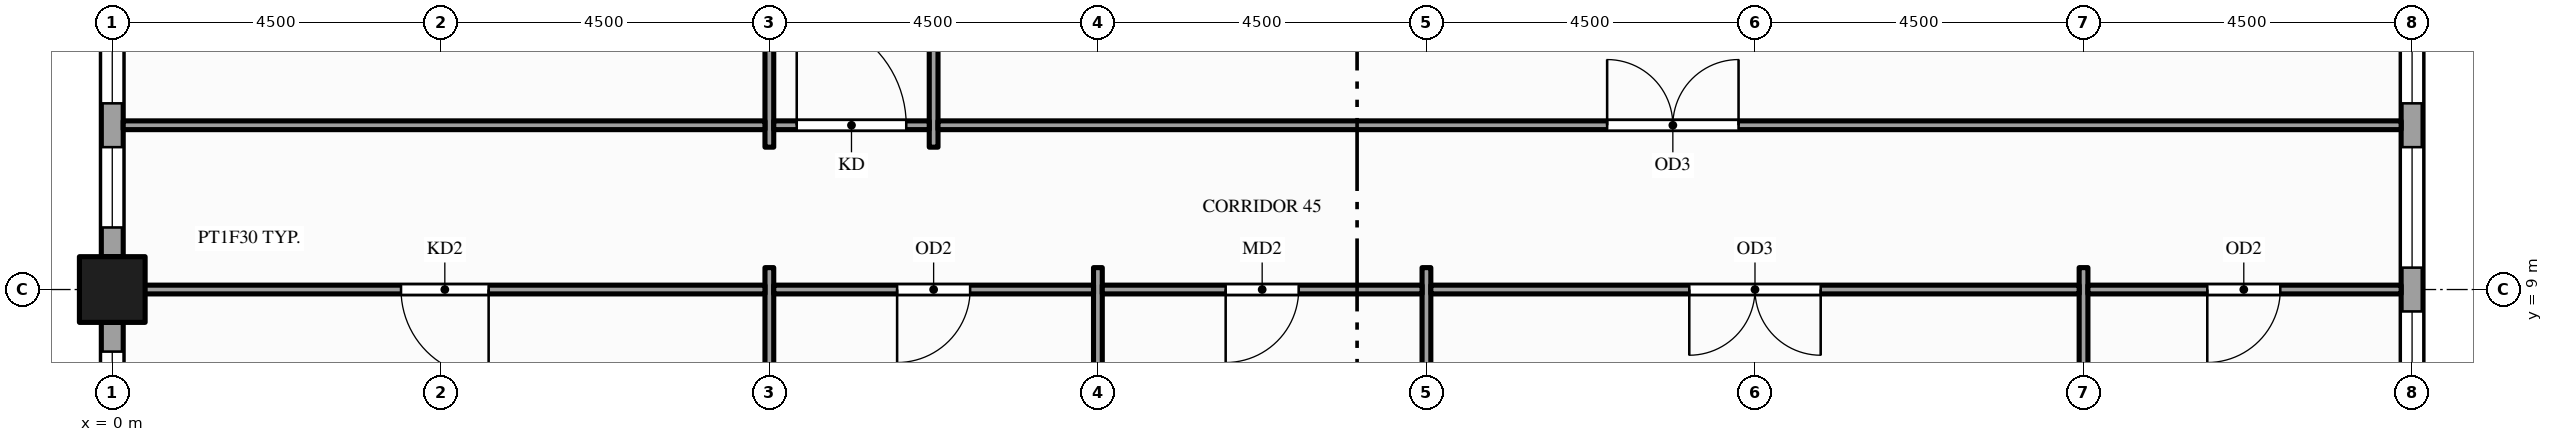
"""IFC4 building model, lengths in metres.
Left out: names, types, materials, properties, quantities, classifications, styles, units other than length and angle.
Written with IfcOpenShell. Run it as: python <this file> out.ifc"""

import sys

from ifc_helpers import new_model, si_unit, direction, frame, frame_2d, origin, origin_2d, place, context, subcontext, project, spatial, rectangle, hollow_rectangle, extrude, element, fill, save


model = new_model("IFC4")
c1 = context("Model", 3, precision=1e-05, world=origin(), true_north=direction((0.0, 1.0)))
c2 = subcontext(c1, "Body", "Model", "MODEL_VIEW")
j1 = project(units=[si_unit("LENGTHUNIT", "METRE"), si_unit("PLANEANGLEUNIT", "RADIAN")], contexts=[c1])
p1 = place(None, origin())
s1 = spatial("IfcSite", under=j1, at=p1, CompositionType="ELEMENT")
p2 = place(p1, origin())
s2 = spatial("IfcBuilding", under=s1, at=p2, CompositionType="ELEMENT")
p3 = place(p2, frame((0.0, 0.0, 147.0)))
s3 = spatial("IfcBuildingStorey", under=s2, at=p3, CompositionType="ELEMENT", Elevation=147.0)
p4 = place(p3, frame((0.0, 9.0, -0.15), z_axis=(0.0, 0.0, 1.0), x_axis=(1.0, 0.0, 0.0)))
e1 = element("IfcColumn", 1, at=p4, inside=s3, PredefinedType="COLUMN", context=c2, shape_type="SweptSolid", body=[
    extrude(hollow_rectangle(XDim=0.9, YDim=0.9, WallThickness=0.045, at=origin_2d()), origin(), (0.0, 0.0, 1.0), 4.0),
])
p5 = place(p3, frame((0.0, 13.05, 0.0), z_axis=(0.0, 0.0, 1.0), x_axis=(0.0, -1.0, 0.0)))
e2 = element("IfcWall", 2, at=p5, inside=s3, PredefinedType="STANDARD", context=c2, shape_type="SweptSolid", body=[
    extrude(rectangle(XDim=3.6, YDim=0.3, at=frame_2d((1.8, 0.0))), origin(), (0.0, 0.0, 1.0), 3.149),
])
p6 = place(p5, frame((0.4, 0.0, 0.9)))
e3 = element("IfcOpeningElement", 3, at=p6, cuts=e2, PredefinedType="OPENING", context=c2, shape_type="SweptSolid", body=[
    extrude(rectangle(XDim=1.1, YDim=2.0, at=frame_2d((0.55, 1.0))), frame((0.0, 0.16, 0.0), z_axis=(0.0, -1.0, 0.0), x_axis=(1.0, 0.0, 0.0)), (0.0, 0.0, 1.0), 0.32),
])
p7 = place(p5, frame((2.1, 0.0, 0.9)))
e4 = element("IfcOpeningElement", 4, at=p7, cuts=e2, PredefinedType="OPENING", context=c2, shape_type="SweptSolid", body=[
    extrude(rectangle(XDim=1.1, YDim=2.0, at=frame_2d((0.55, 1.0))), frame((0.0, 0.16, 0.0), z_axis=(0.0, -1.0, 0.0), x_axis=(1.0, 0.0, 0.0)), (0.0, 0.0, 1.0), 0.32),
])
p8 = place(p3, frame((0.0, 8.55, 0.0), z_axis=(0.0, 0.0, 1.0), x_axis=(0.0, -1.0, 0.0)))
e5 = element("IfcWall", 5, at=p8, inside=s3, PredefinedType="STANDARD", context=c2, shape_type="SweptSolid", body=[
    extrude(rectangle(XDim=3.6, YDim=0.3, at=frame_2d((1.8, 0.0))), origin(), (0.0, 0.0, 1.0), 3.149),
])
p9 = place(p8, frame((0.4, 0.0, 0.9)))
e6 = element("IfcOpeningElement", 6, at=p9, cuts=e5, PredefinedType="OPENING", context=c2, shape_type="SweptSolid", body=[
    extrude(rectangle(XDim=1.1, YDim=2.0, at=frame_2d((0.55, 1.0))), frame((0.0, 0.16, 0.0), z_axis=(0.0, -1.0, 0.0), x_axis=(1.0, 0.0, 0.0)), (0.0, 0.0, 1.0), 0.32),
])
p10 = place(p8, frame((2.1, 0.0, 0.9)))
e7 = element("IfcOpeningElement", 7, at=p10, cuts=e5, PredefinedType="OPENING", context=c2, shape_type="SweptSolid", body=[
    extrude(rectangle(XDim=1.1, YDim=2.0, at=frame_2d((0.55, 1.0))), frame((0.0, 0.16, 0.0), z_axis=(0.0, -1.0, 0.0), x_axis=(1.0, 0.0, 0.0)), (0.0, 0.0, 1.0), 0.32),
])
p11 = place(p3, frame((31.5, 1.95, 0.0), z_axis=(0.0, 0.0, 1.0), x_axis=(0.0, 1.0, 0.0)))
e8 = element("IfcWall", 8, at=p11, inside=s3, PredefinedType="STANDARD", context=c2, shape_type="SweptSolid", body=[
    extrude(rectangle(XDim=21.6, YDim=0.3, at=frame_2d((10.8, 0.0))), origin(), (0.0, 0.0, 1.0), 2.87),
])
p12 = place(p11, frame((0.6, 0.0, 0.9)))
e9 = element("IfcOpeningElement", 9, at=p12, cuts=e8, PredefinedType="OPENING", context=c2, shape_type="SweptSolid", body=[
    extrude(rectangle(XDim=1.65, YDim=1.75, at=frame_2d((0.825, 0.875))), frame((0.0, 0.16, 0.0), z_axis=(0.0, -1.0, 0.0), x_axis=(1.0, 0.0, 0.0)), (0.0, 0.0, 1.0), 0.32),
])
p13 = place(p11, frame((2.85, 0.0, 0.9)))
e10 = element("IfcOpeningElement", 10, at=p13, cuts=e8, PredefinedType="OPENING", context=c2, shape_type="SweptSolid", body=[
    extrude(rectangle(XDim=1.65, YDim=1.75, at=frame_2d((0.825, 0.875))), frame((0.0, 0.16, 0.0), z_axis=(0.0, -1.0, 0.0), x_axis=(1.0, 0.0, 0.0)), (0.0, 0.0, 1.0), 0.32),
])
p14 = place(p11, frame((5.1, 0.0, 0.9)))
e11 = element("IfcOpeningElement", 11, at=p14, cuts=e8, PredefinedType="OPENING", context=c2, shape_type="SweptSolid", body=[
    extrude(rectangle(XDim=1.65, YDim=1.75, at=frame_2d((0.825, 0.875))), frame((0.0, 0.16, 0.0), z_axis=(0.0, -1.0, 0.0), x_axis=(1.0, 0.0, 0.0)), (0.0, 0.0, 1.0), 0.32),
])
p15 = place(p11, frame((7.35, 0.0, 0.9)))
e12 = element("IfcOpeningElement", 12, at=p15, cuts=e8, PredefinedType="OPENING", context=c2, shape_type="SweptSolid", body=[
    extrude(rectangle(XDim=1.65, YDim=1.75, at=frame_2d((0.825, 0.875))), frame((0.0, 0.16, 0.0), z_axis=(0.0, -1.0, 0.0), x_axis=(1.0, 0.0, 0.0)), (0.0, 0.0, 1.0), 0.32),
])
p16 = place(p11, frame((9.6, 0.0, 0.9)))
e13 = element("IfcOpeningElement", 13, at=p16, cuts=e8, PredefinedType="OPENING", context=c2, shape_type="SweptSolid", body=[
    extrude(rectangle(XDim=1.65, YDim=1.75, at=frame_2d((0.825, 0.875))), frame((0.0, 0.16, 0.0), z_axis=(0.0, -1.0, 0.0), x_axis=(1.0, 0.0, 0.0)), (0.0, 0.0, 1.0), 0.32),
])
p17 = place(p11, frame((11.85, 0.0, 0.9)))
e14 = element("IfcOpeningElement", 14, at=p17, cuts=e8, PredefinedType="OPENING", context=c2, shape_type="SweptSolid", body=[
    extrude(rectangle(XDim=1.65, YDim=1.75, at=frame_2d((0.825, 0.875))), frame((0.0, 0.16, 0.0), z_axis=(0.0, -1.0, 0.0), x_axis=(1.0, 0.0, 0.0)), (0.0, 0.0, 1.0), 0.32),
])
p18 = place(p11, frame((14.1, 0.0, 0.9)))
e15 = element("IfcOpeningElement", 15, at=p18, cuts=e8, PredefinedType="OPENING", context=c2, shape_type="SweptSolid", body=[
    extrude(rectangle(XDim=1.65, YDim=1.75, at=frame_2d((0.825, 0.875))), frame((0.0, 0.16, 0.0), z_axis=(0.0, -1.0, 0.0), x_axis=(1.0, 0.0, 0.0)), (0.0, 0.0, 1.0), 0.32),
])
p19 = place(p11, frame((16.35, 0.0, 0.9)))
e16 = element("IfcOpeningElement", 16, at=p19, cuts=e8, PredefinedType="OPENING", context=c2, shape_type="SweptSolid", body=[
    extrude(rectangle(XDim=1.65, YDim=1.75, at=frame_2d((0.825, 0.875))), frame((0.0, 0.16, 0.0), z_axis=(0.0, -1.0, 0.0), x_axis=(1.0, 0.0, 0.0)), (0.0, 0.0, 1.0), 0.32),
])
p20 = place(p11, frame((18.6, 0.0, 0.9)))
e17 = element("IfcOpeningElement", 17, at=p20, cuts=e8, PredefinedType="OPENING", context=c2, shape_type="SweptSolid", body=[
    extrude(rectangle(XDim=1.65, YDim=1.75, at=frame_2d((0.825, 0.875))), frame((0.0, 0.16, 0.0), z_axis=(0.0, -1.0, 0.0), x_axis=(1.0, 0.0, 0.0)), (0.0, 0.0, 1.0), 0.32),
])
p21 = place(p3, frame((9.0, 3.875, 0.0), z_axis=(0.0, 0.0, 1.0), x_axis=(0.0, 1.0, 0.0)))
e18 = element("IfcWall", 18, at=p21, inside=s3, PredefinedType="PARTITIONING", context=c2, shape_type="SweptSolid", body=[
    extrude(rectangle(XDim=5.425, YDim=0.12, at=frame_2d((2.712, 0.0))), origin(), (0.0, 0.0, 1.0), 2.87),
])
p22 = place(p3, frame((9.0, 10.95, 0.0), z_axis=(0.0, 0.0, 1.0), x_axis=(0.0, 1.0, 0.0)))
e19 = element("IfcWall", 19, at=p22, inside=s3, PredefinedType="PARTITIONING", context=c2, shape_type="SweptSolid", body=[
    extrude(rectangle(XDim=20.85, YDim=0.12, at=frame_2d((10.425, 0.0))), origin(), (0.0, 0.0, 1.0), 2.6),
])
p23 = place(p22, frame((2.05, 0.0, 0.0)))
e20 = element("IfcOpeningElement", 20, at=p23, cuts=e19, PredefinedType="OPENING", context=c2, shape_type="SweptSolid", body=[
    extrude(rectangle(XDim=1.0, YDim=2.1, at=frame_2d((0.5, 1.05))), frame((0.0, 0.07, 0.0), z_axis=(0.0, -1.0, 0.0), x_axis=(1.0, 0.0, 0.0)), (0.0, 0.0, 1.0), 0.14),
])
p24 = place(p22, frame((6.55, 0.0, 0.0)))
e21 = element("IfcOpeningElement", 21, at=p24, cuts=e19, PredefinedType="OPENING", context=c2, shape_type="SweptSolid", body=[
    extrude(rectangle(XDim=1.0, YDim=2.1, at=frame_2d((0.5, 1.05))), frame((0.0, 0.07, 0.0), z_axis=(0.0, -1.0, 0.0), x_axis=(1.0, 0.0, 0.0)), (0.0, 0.0, 1.0), 0.14),
])
p25 = place(p22, frame((11.805, 0.0, 0.0)))
e22 = element("IfcOpeningElement", 22, at=p25, cuts=e19, PredefinedType="OPENING", context=c2, shape_type="SweptSolid", body=[
    extrude(rectangle(XDim=1.8, YDim=2.1, at=frame_2d((0.9, 1.05))), frame((0.0, 0.07, 0.0), z_axis=(0.0, -1.0, 0.0), x_axis=(1.0, 0.0, 0.0)), (0.0, 0.0, 1.0), 0.14),
])
p26 = place(p3, frame((11.25, 10.95, 0.0), z_axis=(0.0, 0.0, 1.0), x_axis=(0.0, 1.0, 0.0)))
e23 = element("IfcWall", 23, at=p26, inside=s3, PredefinedType="PARTITIONING", context=c2, shape_type="SweptSolid", body=[
    extrude(rectangle(XDim=20.85, YDim=0.12, at=frame_2d((10.425, 0.0))), origin(), (0.0, 0.0, 1.0), 2.6),
])
p27 = place(p26, frame((17.8, 0.0, 0.0)))
e24 = element("IfcOpeningElement", 24, at=p27, cuts=e23, PredefinedType="OPENING", context=c2, shape_type="SweptSolid", body=[
    extrude(rectangle(XDim=1.0, YDim=2.1, at=frame_2d((0.5, 1.05))), frame((0.0, 0.07, 0.0), z_axis=(0.0, -1.0, 0.0), x_axis=(1.0, 0.0, 0.0)), (0.0, 0.0, 1.0), 0.14),
])
p28 = place(p26, frame((4.2, 0.0, 0.0)))
e25 = element("IfcOpeningElement", 25, at=p28, cuts=e23, PredefinedType="OPENING", context=c2, shape_type="SweptSolid", body=[
    extrude(rectangle(XDim=1.2, YDim=2.1, at=frame_2d((0.6, 1.05))), frame((0.0, 0.07, 0.0), z_axis=(0.0, -1.0, 0.0), x_axis=(1.0, 0.0, 0.0)), (0.0, 0.0, 1.0), 0.14),
])
for number, where, z_axis, x_axis in (
    (26, (13.5, 0.15, 0.0), (0.0, 0.0, 1.0), (0.0, 1.0, 0.0)),
    (27, (18.0, 0.15, 0.0), (0.0, 0.0, 1.0), (0.0, 1.0, 0.0)),
):
    element("IfcWall", number, at=place(p3, frame(where, z_axis=z_axis, x_axis=x_axis)), inside=s3, PredefinedType="PARTITIONING", context=c2, shape_type="SweptSolid", body=[
        extrude(rectangle(XDim=9.15, YDim=0.12, at=frame_2d((4.575, 0.0))), origin(), (0.0, 0.0, 1.0), 2.87),
    ])
p29 = place(p3, frame((27.0, 1.65, 0.0), z_axis=(0.0, 0.0, 1.0), x_axis=(0.0, 1.0, 0.0)))
e28 = element("IfcWall", 28, at=p29, inside=s3, PredefinedType="PARTITIONING", context=c2, shape_type="SweptSolid", body=[
    extrude(rectangle(XDim=7.65, YDim=0.12, at=frame_2d((3.825, 0.0))), origin(), (0.0, 0.0, 1.0), 2.87),
])
p30 = place(p3, frame((0.15, 9.0, 0.0), z_axis=(0.0, 0.0, 1.0), x_axis=(1.0, 0.0, 0.0)))
e29 = element("IfcWall", 29, at=p30, inside=s3, PredefinedType="PARTITIONING", context=c2, shape_type="SweptSolid", body=[
    extrude(rectangle(XDim=8.79, YDim=0.12, at=frame_2d((4.395, 0.0))), origin(), (0.0, 0.0, 1.0), 2.87),
])
p31 = place(p30, frame((3.805, 0.0, 0.0)))
e30 = element("IfcOpeningElement", 30, at=p31, cuts=e29, PredefinedType="OPENING", context=c2, shape_type="SweptSolid", body=[
    extrude(rectangle(XDim=1.2, YDim=2.1, at=frame_2d((0.6, 1.05))), frame((0.0, 0.07, 0.0), z_axis=(0.0, -1.0, 0.0), x_axis=(1.0, 0.0, 0.0)), (0.0, 0.0, 1.0), 0.14),
])
p32 = place(p3, frame((9.06, 9.0, 0.0), z_axis=(0.0, 0.0, 1.0), x_axis=(1.0, 0.0, 0.0)))
e31 = element("IfcWall", 31, at=p32, inside=s3, PredefinedType="PARTITIONING", context=c2, shape_type="SweptSolid", body=[
    extrude(rectangle(XDim=4.38, YDim=0.12, at=frame_2d((2.19, 0.0))), origin(), (0.0, 0.0, 1.0), 2.87),
])
p33 = place(p32, frame((1.69, 0.0, 0.0)))
e32 = element("IfcOpeningElement", 32, at=p33, cuts=e31, PredefinedType="OPENING", context=c2, shape_type="SweptSolid", body=[
    extrude(rectangle(XDim=1.0, YDim=2.1, at=frame_2d((0.5, 1.05))), frame((0.0, 0.07, 0.0), z_axis=(0.0, -1.0, 0.0), x_axis=(1.0, 0.0, 0.0)), (0.0, 0.0, 1.0), 0.14),
])
p34 = place(p3, frame((13.56, 9.0, 0.0), z_axis=(0.0, 0.0, 1.0), x_axis=(1.0, 0.0, 0.0)))
e33 = element("IfcWall", 33, at=p34, inside=s3, PredefinedType="PARTITIONING", context=c2, shape_type="SweptSolid", body=[
    extrude(rectangle(XDim=4.38, YDim=0.12, at=frame_2d((2.19, 0.0))), origin(), (0.0, 0.0, 1.0), 2.87),
])
p35 = place(p34, frame((1.69, 0.0, 0.0)))
e34 = element("IfcOpeningElement", 34, at=p35, cuts=e33, PredefinedType="OPENING", context=c2, shape_type="SweptSolid", body=[
    extrude(rectangle(XDim=1.0, YDim=2.1, at=frame_2d((0.5, 1.05))), frame((0.0, 0.07, 0.0), z_axis=(0.0, -1.0, 0.0), x_axis=(1.0, 0.0, 0.0)), (0.0, 0.0, 1.0), 0.14),
])
p36 = place(p3, frame((18.06, 9.0, 0.0), z_axis=(0.0, 0.0, 1.0), x_axis=(1.0, 0.0, 0.0)))
e35 = element("IfcWall", 35, at=p36, inside=s3, PredefinedType="PARTITIONING", context=c2, shape_type="SweptSolid", body=[
    extrude(rectangle(XDim=8.88, YDim=0.12, at=frame_2d((4.44, 0.0))), origin(), (0.0, 0.0, 1.0), 2.87),
])
p37 = place(p36, frame((3.54, 0.0, 0.0)))
e36 = element("IfcOpeningElement", 36, at=p37, cuts=e35, PredefinedType="OPENING", context=c2, shape_type="SweptSolid", body=[
    extrude(rectangle(XDim=1.8, YDim=2.1, at=frame_2d((0.9, 1.05))), frame((0.0, 0.07, 0.0), z_axis=(0.0, -1.0, 0.0), x_axis=(1.0, 0.0, 0.0)), (0.0, 0.0, 1.0), 0.14),
])
p38 = place(p3, frame((27.06, 9.0, 0.0), z_axis=(0.0, 0.0, 1.0), x_axis=(1.0, 0.0, 0.0)))
e37 = element("IfcWall", 37, at=p38, inside=s3, PredefinedType="PARTITIONING", context=c2, shape_type="SweptSolid", body=[
    extrude(rectangle(XDim=4.29, YDim=0.12, at=frame_2d((2.145, 0.0))), origin(), (0.0, 0.0, 1.0), 2.87),
])
p39 = place(p38, frame((1.635, 0.0, 0.0)))
e38 = element("IfcOpeningElement", 38, at=p39, cuts=e37, PredefinedType="OPENING", context=c2, shape_type="SweptSolid", body=[
    extrude(rectangle(XDim=1.0, YDim=2.1, at=frame_2d((0.5, 1.05))), frame((0.0, 0.07, 0.0), z_axis=(0.0, -1.0, 0.0), x_axis=(1.0, 0.0, 0.0)), (0.0, 0.0, 1.0), 0.14),
])
p40 = place(p3, frame((0.15, 11.25, 0.0), z_axis=(0.0, 0.0, 1.0), x_axis=(1.0, 0.0, 0.0)))
e39 = element("IfcWall", 39, at=p40, inside=s3, PredefinedType="PARTITIONING", context=c2, shape_type="SweptSolid", body=[
    extrude(rectangle(XDim=8.79, YDim=0.12, at=frame_2d((4.395, 0.0))), origin(), (0.0, 0.0, 1.0), 2.87),
])
p41 = place(p3, frame((9.06, 11.25, 0.0), z_axis=(0.0, 0.0, 1.0), x_axis=(1.0, 0.0, 0.0)))
e40 = element("IfcWall", 40, at=p41, inside=s3, PredefinedType="PARTITIONING", context=c2, shape_type="SweptSolid", body=[
    extrude(rectangle(XDim=2.13, YDim=0.12, at=frame_2d((1.065, 0.0))), origin(), (0.0, 0.0, 1.0), 2.87),
])
p42 = place(p41, frame((0.315, 0.0, 0.0)))
e41 = element("IfcOpeningElement", 41, at=p42, cuts=e40, PredefinedType="OPENING", context=c2, shape_type="SweptSolid", body=[
    extrude(rectangle(XDim=1.5, YDim=2.1, at=frame_2d((0.75, 1.05))), frame((0.0, 0.07, 0.0), z_axis=(0.0, -1.0, 0.0), x_axis=(1.0, 0.0, 0.0)), (0.0, 0.0, 1.0), 0.14),
])
p43 = place(p3, frame((11.31, 11.25, 0.0), z_axis=(0.0, 0.0, 1.0), x_axis=(1.0, 0.0, 0.0)))
e42 = element("IfcWall", 42, at=p43, inside=s3, PredefinedType="PARTITIONING", context=c2, shape_type="SweptSolid", body=[
    extrude(rectangle(XDim=20.04, YDim=0.12, at=frame_2d((10.02, 0.0))), origin(), (0.0, 0.0, 1.0), 2.87),
])
p44 = place(p43, frame((9.165, 0.0, 0.0)))
e43 = element("IfcOpeningElement", 43, at=p44, cuts=e42, PredefinedType="OPENING", context=c2, shape_type="SweptSolid", body=[
    extrude(rectangle(XDim=1.8, YDim=2.1, at=frame_2d((0.9, 1.05))), frame((0.0, 0.07, 0.0), z_axis=(0.0, -1.0, 0.0), x_axis=(1.0, 0.0, 0.0)), (0.0, 0.0, 1.0), 0.14),
])
p45 = place(p6, origin())
e44 = element("IfcWindow", 44, at=p45, inside=s3, PartitioningType="SINGLE_PANEL", PredefinedType="WINDOW", context=c2, shape_type="SweptSolid", body=[
    extrude(rectangle(XDim=1.1, YDim=2.0, at=frame_2d((0.55, 1.0))), frame((0.0, 0.03, 0.0), z_axis=(0.0, -1.0, 0.0), x_axis=(1.0, 0.0, 0.0)), (0.0, 0.0, 1.0), 0.06),
])
fill(e3, e44)
p46 = place(p7, origin())
e45 = element("IfcWindow", 45, at=p46, inside=s3, PartitioningType="SINGLE_PANEL", PredefinedType="WINDOW", context=c2, shape_type="SweptSolid", body=[
    extrude(rectangle(XDim=1.1, YDim=2.0, at=frame_2d((0.55, 1.0))), frame((0.0, 0.03, 0.0), z_axis=(0.0, -1.0, 0.0), x_axis=(1.0, 0.0, 0.0)), (0.0, 0.0, 1.0), 0.06),
])
fill(e4, e45)
p47 = place(p9, origin())
e46 = element("IfcWindow", 46, at=p47, inside=s3, PartitioningType="SINGLE_PANEL", PredefinedType="WINDOW", context=c2, shape_type="SweptSolid", body=[
    extrude(rectangle(XDim=1.1, YDim=2.0, at=frame_2d((0.55, 1.0))), frame((0.0, 0.03, 0.0), z_axis=(0.0, -1.0, 0.0), x_axis=(1.0, 0.0, 0.0)), (0.0, 0.0, 1.0), 0.06),
])
fill(e6, e46)
p48 = place(p14, origin())
e47 = element("IfcWindow", 47, at=p48, inside=s3, PartitioningType="SINGLE_PANEL", PredefinedType="WINDOW", context=c2, shape_type="SweptSolid", body=[
    extrude(rectangle(XDim=1.65, YDim=1.75, at=frame_2d((0.825, 0.875))), frame((0.0, 0.03, 0.0), z_axis=(0.0, -1.0, 0.0), x_axis=(1.0, 0.0, 0.0)), (0.0, 0.0, 1.0), 0.06),
])
fill(e11, e47)
p49 = place(p15, origin())
e48 = element("IfcWindow", 48, at=p49, inside=s3, PartitioningType="SINGLE_PANEL", PredefinedType="WINDOW", context=c2, shape_type="SweptSolid", body=[
    extrude(rectangle(XDim=1.65, YDim=1.75, at=frame_2d((0.825, 0.875))), frame((0.0, 0.03, 0.0), z_axis=(0.0, -1.0, 0.0), x_axis=(1.0, 0.0, 0.0)), (0.0, 0.0, 1.0), 0.06),
])
fill(e12, e48)
p50 = place(p16, origin())
e49 = element("IfcWindow", 49, at=p50, inside=s3, PartitioningType="SINGLE_PANEL", PredefinedType="WINDOW", context=c2, shape_type="SweptSolid", body=[
    extrude(rectangle(XDim=1.65, YDim=1.75, at=frame_2d((0.825, 0.875))), frame((0.0, 0.03, 0.0), z_axis=(0.0, -1.0, 0.0), x_axis=(1.0, 0.0, 0.0)), (0.0, 0.0, 1.0), 0.06),
])
fill(e13, e49)
p51 = place(p31, origin())
e50 = element("IfcDoor", 50, at=p51, inside=s3, OperationType="SINGLE_SWING_RIGHT", PredefinedType="DOOR", context=c2, shape_type="SweptSolid", body=[
    extrude(rectangle(XDim=1.2, YDim=2.1, at=frame_2d((0.6, 1.05))), frame((0.0, 0.025, 0.0), z_axis=(0.0, -1.0, 0.0), x_axis=(1.0, 0.0, 0.0)), (0.0, 0.0, 1.0), 0.05),
])
fill(e30, e50)
p52 = place(p33, origin())
e51 = element("IfcDoor", 51, at=p52, inside=s3, OperationType="SINGLE_SWING_LEFT", PredefinedType="DOOR", context=c2, shape_type="SweptSolid", body=[
    extrude(rectangle(XDim=1.0, YDim=2.1, at=frame_2d((0.5, 1.05))), frame((0.0, 0.025, 0.0), z_axis=(0.0, -1.0, 0.0), x_axis=(1.0, 0.0, 0.0)), (0.0, 0.0, 1.0), 0.05),
])
fill(e32, e51)
p53 = place(p35, origin())
e52 = element("IfcDoor", 52, at=p53, inside=s3, OperationType="SINGLE_SWING_LEFT", PredefinedType="DOOR", context=c2, shape_type="SweptSolid", body=[
    extrude(rectangle(XDim=1.0, YDim=2.1, at=frame_2d((0.5, 1.05))), frame((0.0, 0.025, 0.0), z_axis=(0.0, -1.0, 0.0), x_axis=(1.0, 0.0, 0.0)), (0.0, 0.0, 1.0), 0.05),
])
fill(e34, e52)
p54 = place(p37, origin())
e53 = element("IfcDoor", 53, at=p54, inside=s3, OperationType="DOUBLE_DOOR_SINGLE_SWING", PredefinedType="DOOR", context=c2, shape_type="SweptSolid", body=[
    extrude(rectangle(XDim=1.8, YDim=2.1, at=frame_2d((0.9, 1.05))), frame((0.0, 0.025, 0.0), z_axis=(0.0, -1.0, 0.0), x_axis=(1.0, 0.0, 0.0)), (0.0, 0.0, 1.0), 0.05),
])
fill(e36, e53)
p55 = place(p39, origin())
e54 = element("IfcDoor", 54, at=p55, inside=s3, OperationType="SINGLE_SWING_LEFT", PredefinedType="DOOR", context=c2, shape_type="SweptSolid", body=[
    extrude(rectangle(XDim=1.0, YDim=2.1, at=frame_2d((0.5, 1.05))), frame((0.0, 0.025, 0.0), z_axis=(0.0, -1.0, 0.0), x_axis=(1.0, 0.0, 0.0)), (0.0, 0.0, 1.0), 0.05),
])
fill(e38, e54)
p56 = place(p44, origin())
e55 = element("IfcDoor", 55, at=p56, inside=s3, OperationType="DOUBLE_DOOR_SINGLE_SWING", PredefinedType="DOOR", context=c2, shape_type="SweptSolid", body=[
    extrude(rectangle(XDim=1.8, YDim=2.1, at=frame_2d((0.9, 1.05))), frame((0.0, 0.025, 0.0), z_axis=(0.0, -1.0, 0.0), x_axis=(1.0, 0.0, 0.0)), (0.0, 0.0, 1.0), 0.05),
])
fill(e43, e55)
p57 = place(p42, origin())
e56 = element("IfcDoor", 56, at=p57, inside=s3, OperationType="SINGLE_SWING_LEFT", PredefinedType="DOOR", context=c2, shape_type="SweptSolid", body=[
    extrude(rectangle(XDim=1.5, YDim=2.1, at=frame_2d((0.75, 1.05))), frame((0.0, 0.025, 0.0), z_axis=(0.0, -1.0, 0.0), x_axis=(1.0, 0.0, 0.0)), (0.0, 0.0, 1.0), 0.05),
])
fill(e41, e56)
save(model, sys.argv[1])
